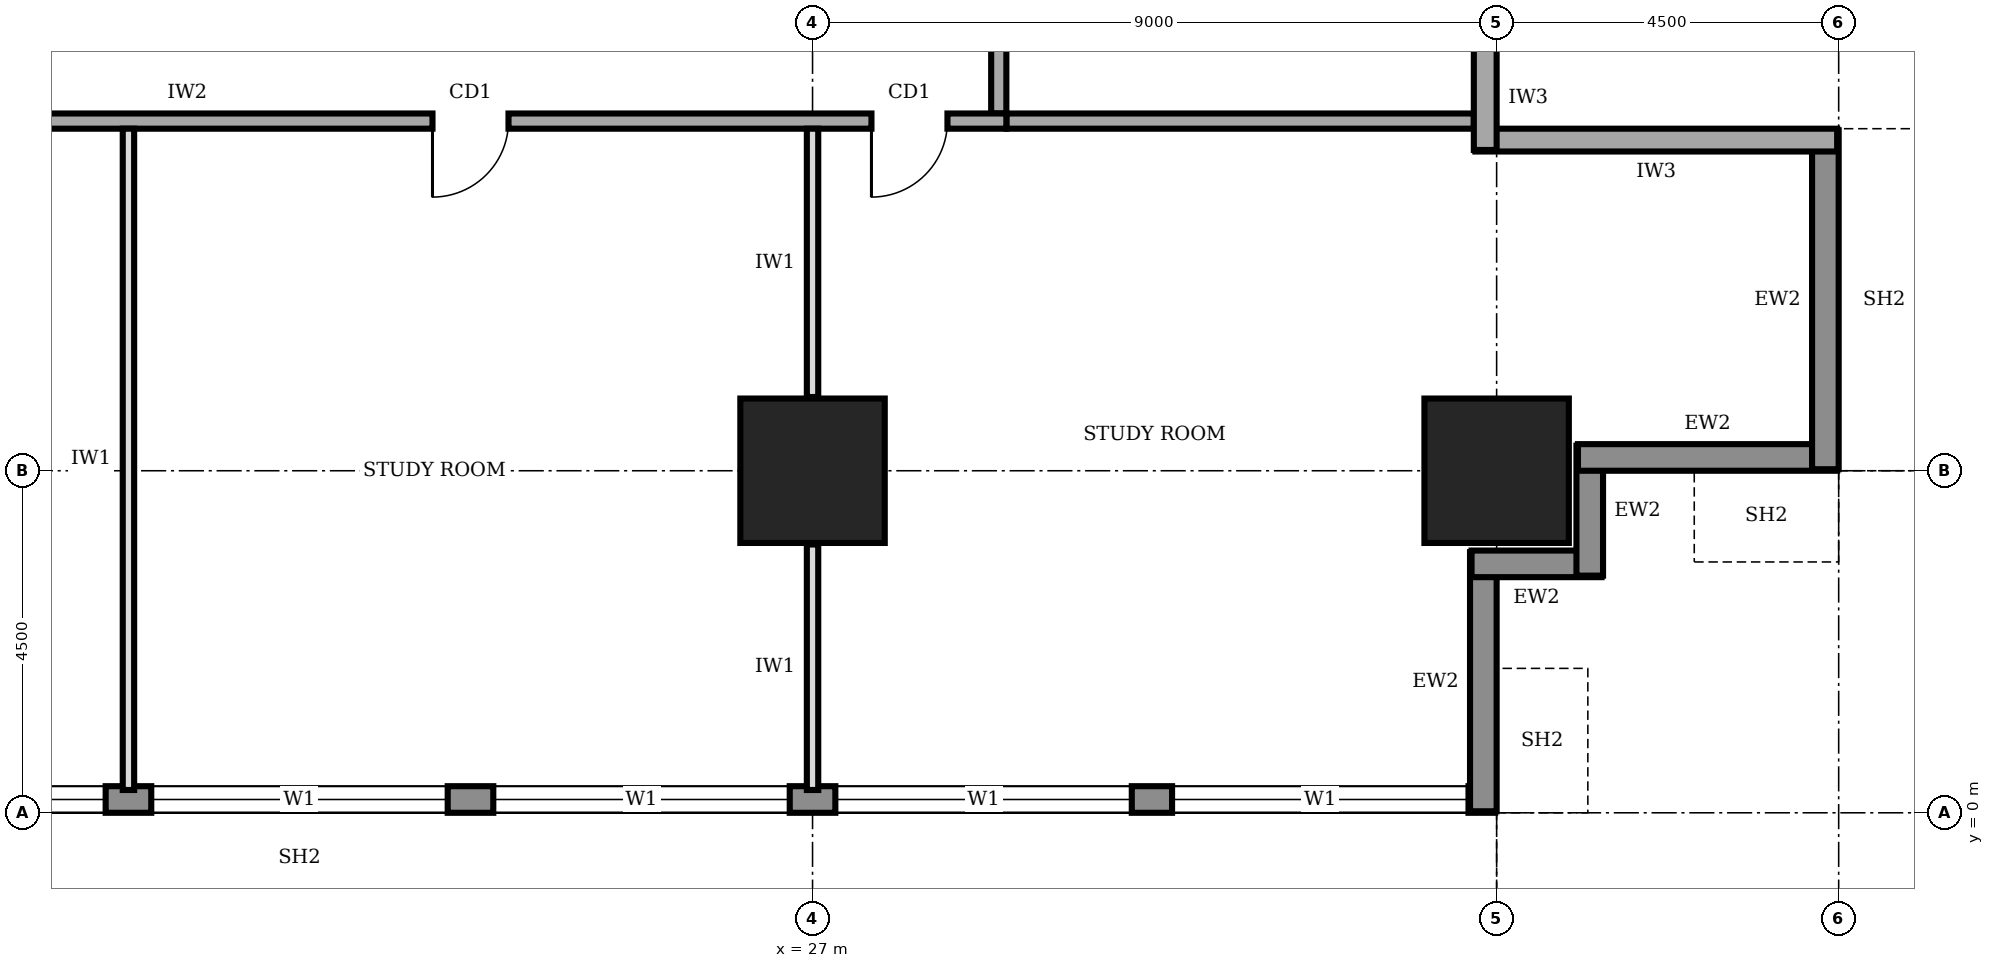
"""IFC4 building model, lengths in metres.
Left out: names, types, materials, properties, quantities, classifications, styles, units other than length and angle.
Written with IfcOpenShell. Run it as: python <this file> out.ifc"""

import sys

from ifc_helpers import new_model, si_unit, direction, frame, frame_2d, origin, origin_2d, place, context, subcontext, project, spatial, rectangle, extrude, element, fill, save


model = new_model("IFC4")
c1 = context("Model", 3, precision=1e-05, world=origin(), true_north=direction((0.0, 1.0)))
c2 = subcontext(c1, "Body", "Model", "MODEL_VIEW")
j1 = project(units=[si_unit("LENGTHUNIT", "METRE"), si_unit("PLANEANGLEUNIT", "RADIAN")], contexts=[c1])
p1 = place(None, origin())
s1 = spatial("IfcSite", under=j1, at=p1, CompositionType="ELEMENT")
p2 = place(p1, origin())
s2 = spatial("IfcBuilding", under=s1, at=p2, CompositionType="ELEMENT")
p3 = place(p2, frame((0.0, 0.0, 117.0)))
s3 = spatial("IfcBuildingStorey", under=s2, at=p3, CompositionType="ELEMENT", Elevation=117.0)
for number, where, z_axis, x_axis in (
    (1, (27.0, 4.5, 0.0), (0.0, 0.0, 1.0), (1.0, 0.0, 0.0)),
    (2, (36.0, 4.5, 0.0), (0.0, 0.0, 1.0), (1.0, 0.0, 0.0)),
):
    element("IfcColumn", number, at=place(p3, frame(where, z_axis=z_axis, x_axis=x_axis)), inside=s3, PredefinedType="COLUMN", context=c2, shape_type="SweptSolid", body=[
        extrude(rectangle(XDim=1.9, YDim=1.9, at=origin_2d()), origin(), (0.0, 0.0, 1.0), 4.0),
    ])
p4 = place(p3, frame((4.52, 0.175, 0.0), z_axis=(0.0, 0.0, 1.0), x_axis=(1.0, 0.0, 0.0)))
e3 = element("IfcWall", 3, at=p4, inside=s3, PredefinedType="STANDARD", context=c2, shape_type="SweptSolid", body=[
    extrude(rectangle(XDim=31.46, YDim=0.35, at=frame_2d((15.73, 0.0))), origin(), (0.0, 0.0, 1.0), 3.75),
])
p5 = place(p4, frame((4.78, 0.0, 0.9)))
e4 = element("IfcOpeningElement", 4, at=p5, cuts=e3, PredefinedType="OPENING", context=c2, shape_type="SweptSolid", body=[
    extrude(rectangle(XDim=3.9, YDim=2.2, at=frame_2d((1.95, 1.1))), frame((0.0, 0.185, 0.0), z_axis=(0.0, -1.0, 0.0), x_axis=(1.0, 0.0, 0.0)), (0.0, 0.0, 1.0), 0.37),
])
p6 = place(p4, frame((9.28, 0.0, 0.9)))
e5 = element("IfcOpeningElement", 5, at=p6, cuts=e3, PredefinedType="OPENING", context=c2, shape_type="SweptSolid", body=[
    extrude(rectangle(XDim=3.9, YDim=2.2, at=frame_2d((1.95, 1.1))), frame((0.0, 0.185, 0.0), z_axis=(0.0, -1.0, 0.0), x_axis=(1.0, 0.0, 0.0)), (0.0, 0.0, 1.0), 0.37),
])
p7 = place(p4, frame((13.78, 0.0, 0.9)))
e6 = element("IfcOpeningElement", 6, at=p7, cuts=e3, PredefinedType="OPENING", context=c2, shape_type="SweptSolid", body=[
    extrude(rectangle(XDim=3.9, YDim=2.2, at=frame_2d((1.95, 1.1))), frame((0.0, 0.185, 0.0), z_axis=(0.0, -1.0, 0.0), x_axis=(1.0, 0.0, 0.0)), (0.0, 0.0, 1.0), 0.37),
])
p8 = place(p4, frame((18.28, 0.0, 0.9)))
e7 = element("IfcOpeningElement", 7, at=p8, cuts=e3, PredefinedType="OPENING", context=c2, shape_type="SweptSolid", body=[
    extrude(rectangle(XDim=3.9, YDim=2.2, at=frame_2d((1.95, 1.1))), frame((0.0, 0.185, 0.0), z_axis=(0.0, -1.0, 0.0), x_axis=(1.0, 0.0, 0.0)), (0.0, 0.0, 1.0), 0.37),
])
p9 = place(p4, frame((22.78, 0.0, 0.9)))
e8 = element("IfcOpeningElement", 8, at=p9, cuts=e3, PredefinedType="OPENING", context=c2, shape_type="SweptSolid", body=[
    extrude(rectangle(XDim=3.9, YDim=2.2, at=frame_2d((1.95, 1.1))), frame((0.0, 0.185, 0.0), z_axis=(0.0, -1.0, 0.0), x_axis=(1.0, 0.0, 0.0)), (0.0, 0.0, 1.0), 0.37),
])
p10 = place(p4, frame((27.21, 0.0, 0.9)))
e9 = element("IfcOpeningElement", 9, at=p10, cuts=e3, PredefinedType="OPENING", context=c2, shape_type="SweptSolid", body=[
    extrude(rectangle(XDim=3.9, YDim=2.2, at=frame_2d((1.95, 1.1))), frame((0.0, 0.185, 0.0), z_axis=(0.0, -1.0, 0.0), x_axis=(1.0, 0.0, 0.0)), (0.0, 0.0, 1.0), 0.37),
])
p11 = place(p3, frame((35.825, 0.02, 0.0), z_axis=(0.0, 0.0, 1.0), x_axis=(0.0, 1.0, 0.0)))
e10 = element("IfcWall", 10, at=p11, inside=s3, PredefinedType="STANDARD", context=c2, shape_type="SweptSolid", body=[
    extrude(rectangle(XDim=3.41, YDim=0.35, at=frame_2d((1.705, 0.0))), origin(), (0.0, 0.0, 1.0), 2.85),
])
for number, where, z_axis, x_axis in (
    (11, (35.67, 3.275, 0.0), (0.0, 0.0, 1.0), (1.0, 0.0, 0.0)),
    (12, (37.225, 3.12, 0.0), (0.0, 0.0, 1.0), (0.0, 1.0, 0.0)),
):
    element("IfcWall", number, at=place(p3, frame(where, z_axis=z_axis, x_axis=x_axis)), inside=s3, PredefinedType="STANDARD", context=c2, shape_type="SweptSolid", body=[
        extrude(rectangle(XDim=1.71, YDim=0.35, at=frame_2d((0.855, 0.0))), origin(), (0.0, 0.0, 1.0), 3.75),
    ])
p12 = place(p3, frame((37.07, 4.675, 0.0), z_axis=(0.0, 0.0, 1.0), x_axis=(1.0, 0.0, 0.0)))
e13 = element("IfcWall", 13, at=p12, inside=s3, PredefinedType="STANDARD", context=c2, shape_type="SweptSolid", body=[
    extrude(rectangle(XDim=3.41, YDim=0.35, at=frame_2d((1.705, 0.0))), origin(), (0.0, 0.0, 1.0), 2.85),
])
p13 = place(p3, frame((40.325, 4.52, 0.0), z_axis=(0.0, 0.0, 1.0), x_axis=(0.0, 1.0, 0.0)))
e14 = element("IfcWall", 14, at=p13, inside=s3, PredefinedType="STANDARD", context=c2, shape_type="SweptSolid", body=[
    extrude(rectangle(XDim=4.46, YDim=0.35, at=frame_2d((2.23, 0.0))), origin(), (0.0, 0.0, 1.0), 3.75),
])
p14 = place(p3, frame((40.48, 8.85, 0.0), z_axis=(0.0, 0.0, 1.0), x_axis=(-1.0, 0.0, 0.0)))
e15 = element("IfcWall", 15, at=p14, inside=s3, PredefinedType="SOLIDWALL", context=c2, shape_type="SweptSolid", body=[
    extrude(rectangle(XDim=4.76, YDim=0.3, at=frame_2d((2.38, 0.0))), origin(), (0.0, 0.0, 1.0), 3.75),
])
p15 = place(p3, frame((35.85, 8.72, 0.0), z_axis=(0.0, 0.0, 1.0), x_axis=(0.0, 1.0, 0.0)))
e16 = element("IfcWall", 16, at=p15, inside=s3, PredefinedType="SOLIDWALL", context=c2, shape_type="SweptSolid", body=[
    extrude(rectangle(XDim=1.38, YDim=0.3, at=frame_2d((0.69, 0.0))), origin(), (0.0, 0.0, 1.0), 2.65),
])
p16 = place(p3, frame((11.9, 9.1, 0.0), z_axis=(0.0, 0.0, 1.0), x_axis=(1.0, 0.0, 0.0)))
e17 = element("IfcWall", 17, at=p16, inside=s3, PredefinedType="SOLIDWALL", context=c2, shape_type="SweptSolid", body=[
    extrude(rectangle(XDim=17.65, YDim=0.2, at=frame_2d((8.825, 0.0))), origin(), (0.0, 0.0, 1.0), 3.75),
])
p17 = place(p16, frame((2.25, 0.0, 0.0)))
e18 = element("IfcOpeningElement", 18, at=p17, cuts=e17, PredefinedType="OPENING", context=c2, shape_type="SweptSolid", body=[
    extrude(rectangle(XDim=1.4, YDim=2.1, at=frame_2d((0.7, 1.05))), frame((0.0, 0.11, 0.0), z_axis=(0.0, -1.0, 0.0), x_axis=(1.0, 0.0, 0.0)), (0.0, 0.0, 1.0), 0.22),
])
p18 = place(p16, frame((10.1, 0.0, 0.0)))
e19 = element("IfcOpeningElement", 19, at=p18, cuts=e17, PredefinedType="OPENING", context=c2, shape_type="SweptSolid", body=[
    extrude(rectangle(XDim=1.0, YDim=2.1, at=frame_2d((0.5, 1.05))), frame((0.0, 0.11, 0.0), z_axis=(0.0, -1.0, 0.0), x_axis=(1.0, 0.0, 0.0)), (0.0, 0.0, 1.0), 0.22),
])
p19 = place(p16, frame((15.875, 0.0, 0.0)))
e20 = element("IfcOpeningElement", 20, at=p19, cuts=e17, PredefinedType="OPENING", context=c2, shape_type="SweptSolid", body=[
    extrude(rectangle(XDim=1.0, YDim=2.1, at=frame_2d((0.5, 1.05))), frame((0.0, 0.11, 0.0), z_axis=(0.0, -1.0, 0.0), x_axis=(1.0, 0.0, 0.0)), (0.0, 0.0, 1.0), 0.22),
])
p20 = place(p3, frame((29.45, 9.2, 0.0), z_axis=(0.0, 0.0, 1.0), x_axis=(0.0, 1.0, 0.0)))
e21 = element("IfcWall", 21, at=p20, inside=s3, PredefinedType="SOLIDWALL", context=c2, shape_type="SweptSolid", body=[
    extrude(rectangle(XDim=23.05, YDim=0.2, at=frame_2d((11.525, 0.0))), origin(), (0.0, 0.0, 1.0), 3.75),
])
p21 = place(p20, frame((10.525, 0.0, 0.0)))
e22 = element("IfcOpeningElement", 22, at=p21, cuts=e21, PredefinedType="OPENING", context=c2, shape_type="SweptSolid", body=[
    extrude(rectangle(XDim=1.8, YDim=2.1, at=frame_2d((0.9, 1.05))), frame((0.0, 0.11, 0.0), z_axis=(0.0, -1.0, 0.0), x_axis=(1.0, 0.0, 0.0)), (0.0, 0.0, 1.0), 0.22),
])
p22 = place(p3, frame((29.55, 9.1, 0.0), z_axis=(0.0, 0.0, 1.0), x_axis=(1.0, 0.0, 0.0)))
e23 = element("IfcWall", 23, at=p22, inside=s3, PredefinedType="SOLIDWALL", context=c2, shape_type="SweptSolid", body=[
    extrude(rectangle(XDim=6.15, YDim=0.2, at=frame_2d((3.075, 0.0))), origin(), (0.0, 0.0, 1.0), 3.75),
])
p23 = place(p3, frame((18.0, 0.3, 0.0), z_axis=(0.0, 0.0, 1.0), x_axis=(0.0, 1.0, 0.0)))
e24 = element("IfcWall", 24, at=p23, inside=s3, PredefinedType="PARTITIONING", context=c2, shape_type="SweptSolid", body=[
    extrude(rectangle(XDim=8.7, YDim=0.15, at=frame_2d((4.35, 0.0))), origin(), (0.0, 0.0, 1.0), 3.75),
])
p24 = place(p3, frame((27.0, 0.3, 0.0), z_axis=(0.0, 0.0, 1.0), x_axis=(0.0, 1.0, 0.0)))
e25 = element("IfcWall", 25, at=p24, inside=s3, PredefinedType="PARTITIONING", context=c2, shape_type="SweptSolid", body=[
    extrude(rectangle(XDim=3.23, YDim=0.15, at=frame_2d((1.615, 0.0))), origin(), (0.0, 0.0, 1.0), 2.85),
])
p25 = place(p3, frame((27.0, 5.47, 0.0), z_axis=(0.0, 0.0, 1.0), x_axis=(0.0, 1.0, 0.0)))
e26 = element("IfcWall", 26, at=p25, inside=s3, PredefinedType="PARTITIONING", context=c2, shape_type="SweptSolid", body=[
    extrude(rectangle(XDim=3.53, YDim=0.15, at=frame_2d((1.765, 0.0))), origin(), (0.0, 0.0, 1.0), 2.85),
])
p26 = place(p6, origin())
e27 = element("IfcWindow", 27, at=p26, inside=s3, PartitioningType="SINGLE_PANEL", PredefinedType="WINDOW", context=c2, shape_type="SweptSolid", body=[
    extrude(rectangle(XDim=3.9, YDim=2.2, at=frame_2d((1.95, 1.1))), frame((0.0, 0.03, 0.0), z_axis=(0.0, -1.0, 0.0), x_axis=(1.0, 0.0, 0.0)), (0.0, 0.0, 1.0), 0.06),
])
fill(e5, e27)
p27 = place(p7, origin())
e28 = element("IfcWindow", 28, at=p27, inside=s3, PartitioningType="SINGLE_PANEL", PredefinedType="WINDOW", context=c2, shape_type="SweptSolid", body=[
    extrude(rectangle(XDim=3.9, YDim=2.2, at=frame_2d((1.95, 1.1))), frame((0.0, 0.03, 0.0), z_axis=(0.0, -1.0, 0.0), x_axis=(1.0, 0.0, 0.0)), (0.0, 0.0, 1.0), 0.06),
])
fill(e6, e28)
p28 = place(p8, origin())
e29 = element("IfcWindow", 29, at=p28, inside=s3, PartitioningType="SINGLE_PANEL", PredefinedType="WINDOW", context=c2, shape_type="SweptSolid", body=[
    extrude(rectangle(XDim=3.9, YDim=2.2, at=frame_2d((1.95, 1.1))), frame((0.0, 0.03, 0.0), z_axis=(0.0, -1.0, 0.0), x_axis=(1.0, 0.0, 0.0)), (0.0, 0.0, 1.0), 0.06),
])
fill(e7, e29)
p29 = place(p9, origin())
e30 = element("IfcWindow", 30, at=p29, inside=s3, PartitioningType="SINGLE_PANEL", PredefinedType="WINDOW", context=c2, shape_type="SweptSolid", body=[
    extrude(rectangle(XDim=3.9, YDim=2.2, at=frame_2d((1.95, 1.1))), frame((0.0, 0.03, 0.0), z_axis=(0.0, -1.0, 0.0), x_axis=(1.0, 0.0, 0.0)), (0.0, 0.0, 1.0), 0.06),
])
fill(e8, e30)
p30 = place(p10, origin())
e31 = element("IfcWindow", 31, at=p30, inside=s3, PartitioningType="SINGLE_PANEL", PredefinedType="WINDOW", context=c2, shape_type="SweptSolid", body=[
    extrude(rectangle(XDim=3.9, YDim=2.2, at=frame_2d((1.95, 1.1))), frame((0.0, 0.03, 0.0), z_axis=(0.0, -1.0, 0.0), x_axis=(1.0, 0.0, 0.0)), (0.0, 0.0, 1.0), 0.06),
])
fill(e9, e31)
p31 = place(p18, frame((1.0, 0.0, 0.0), z_axis=(0.0, 0.0, 1.0), x_axis=(-1.0, 0.0, 0.0)))
e32 = element("IfcDoor", 32, at=p31, inside=s3, OperationType="SINGLE_SWING_RIGHT", PredefinedType="DOOR", context=c2, shape_type="SweptSolid", body=[
    extrude(rectangle(XDim=1.0, YDim=2.1, at=frame_2d((0.5, 1.05))), frame((0.0, 0.025, 0.0), z_axis=(0.0, -1.0, 0.0), x_axis=(1.0, 0.0, 0.0)), (0.0, 0.0, 1.0), 0.05),
])
fill(e19, e32)
p32 = place(p19, frame((1.0, 0.0, 0.0), z_axis=(0.0, 0.0, 1.0), x_axis=(-1.0, 0.0, 0.0)))
e33 = element("IfcDoor", 33, at=p32, inside=s3, OperationType="SINGLE_SWING_RIGHT", PredefinedType="DOOR", context=c2, shape_type="SweptSolid", body=[
    extrude(rectangle(XDim=1.0, YDim=2.1, at=frame_2d((0.5, 1.05))), frame((0.0, 0.025, 0.0), z_axis=(0.0, -1.0, 0.0), x_axis=(1.0, 0.0, 0.0)), (0.0, 0.0, 1.0), 0.05),
])
fill(e20, e33)
save(model, sys.argv[1])
